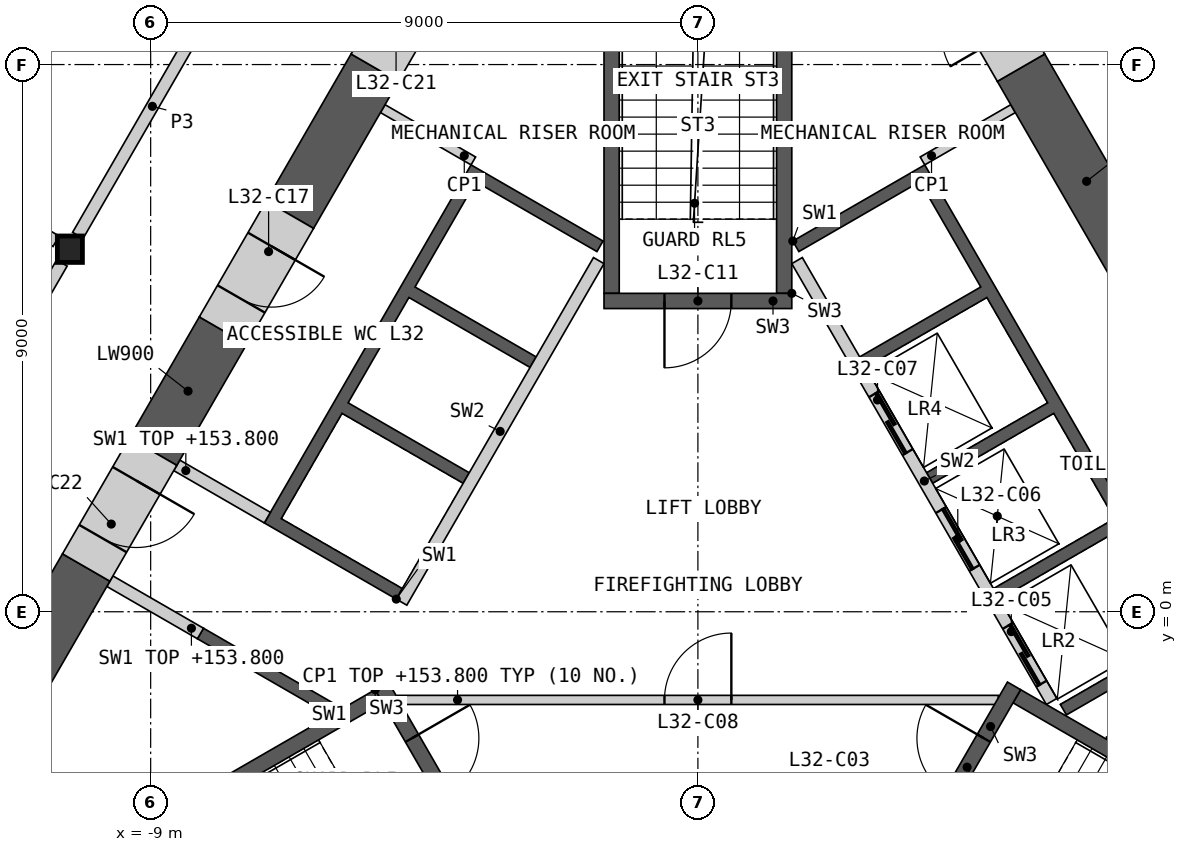
"""IFC4 building model, lengths in metres.
Left out: names, types, materials, properties, quantities, classifications, styles, units other than length and angle.
Written with IfcOpenShell. Run it as: python <this file> out.ifc"""

import sys

from ifc_helpers import new_model, si_unit, direction, frame, frame_2d, origin, origin_2d, place, context, subcontext, project, spatial, polyline, rectangle, i_section, outline, extrude, element, fill, save


model = new_model("IFC4")
c1 = context("Model", 3, precision=1e-05, world=origin(), true_north=direction((0.0, 1.0)))
c2 = subcontext(c1, "Body", "Model", "MODEL_VIEW")
j1 = project(units=[si_unit("LENGTHUNIT", "METRE"), si_unit("PLANEANGLEUNIT", "RADIAN")], contexts=[c1])
p1 = place(None, origin())
s1 = spatial("IfcSite", under=j1, at=p1, CompositionType="ELEMENT")
p2 = place(p1, origin())
s2 = spatial("IfcBuilding", under=s1, at=p2, CompositionType="ELEMENT")
p3 = place(p2, frame((0.0, 0.0, 150.0)))
s3 = spatial("IfcBuildingStorey", under=s2, at=p3, CompositionType="ELEMENT", Elevation=150.0)
p4 = place(p3, frame((-10.328, 5.963, 0.0), z_axis=(0.0, 0.0, 1.0), x_axis=(1.0, 0.0, 0.0)))
e1 = element("IfcColumn", 1, at=p4, inside=s3, PredefinedType="COLUMN", context=c2, shape_type="SweptSolid", body=[
    extrude(i_section(OverallWidth=0.412, OverallDepth=0.435, WebThickness=0.036, FlangeThickness=0.057, at=origin_2d()), origin(), (0.0, 0.0, 1.0), 4.2),
])
p5 = place(p3, origin())
e2 = element("IfcWall", 2, at=p5, inside=s3, PredefinedType="SHEAR", context=c2, shape_type="SweptSolid", body=[
    extrude(outline(polyline([(1.561, 6.097), (3.731, 7.35), (8.231, -0.444), (6.061, -1.697), (5.96, -1.524), (7.952, -0.374), (6.952, 1.358), (4.96, 0.208), (4.861, 0.381), (6.852, 1.531), (5.852, 3.263), (3.861, 2.113), (3.76, 2.287), (5.752, 3.437), (4.752, 5.169), (2.76, 4.019), (2.66, 4.192), (4.652, 5.342), (3.652, 7.074), (1.66, 5.924), (1.561, 6.097)])), origin(), (0.0, 0.0, 1.0), 3.8),
])
p6 = place(p3, frame((5.817, -1.476, 0.0), z_axis=(0.0, 0.0, 1.0), x_axis=(-0.500002616675, 0.866023893041, 0.0)))
e3 = element("IfcWall", 3, at=p6, inside=s3, PredefinedType="SOLIDWALL", context=c2, shape_type="SweptSolid", body=[
    extrude(rectangle(XDim=8.373, YDim=0.2, at=frame_2d((4.187, 0.0))), origin(), (0.0, 0.0, 1.0), 3.8),
])
p7 = place(p6, frame((0.337, 0.0, 0.0)))
e4 = element("IfcOpeningElement", 4, at=p7, cuts=e3, PredefinedType="OPENING", context=c2, shape_type="SweptSolid", body=[
    extrude(rectangle(XDim=1.1, YDim=2.1, at=frame_2d((0.55, 1.05))), frame((0.0, 0.11, 0.0), z_axis=(0.0, -1.0, 0.0), x_axis=(1.0, 0.0, 0.0)), (0.0, 0.0, 1.0), 0.22),
])
p8 = place(p6, frame((2.537, 0.0, 0.0)))
e5 = element("IfcOpeningElement", 5, at=p8, cuts=e3, PredefinedType="OPENING", context=c2, shape_type="SweptSolid", body=[
    extrude(rectangle(XDim=1.1, YDim=2.1, at=frame_2d((0.55, 1.05))), frame((0.0, 0.11, 0.0), z_axis=(0.0, -1.0, 0.0), x_axis=(1.0, 0.0, 0.0)), (0.0, 0.0, 1.0), 0.22),
])
p9 = place(p6, frame((4.737, 0.0, 0.0)))
e6 = element("IfcOpeningElement", 6, at=p9, cuts=e3, PredefinedType="OPENING", context=c2, shape_type="SweptSolid", body=[
    extrude(rectangle(XDim=1.1, YDim=2.1, at=frame_2d((0.55, 1.05))), frame((0.0, 0.11, 0.0), z_axis=(0.0, -1.0, 0.0), x_axis=(1.0, 0.0, 0.0)), (0.0, 0.0, 1.0), 0.22),
])
p10 = place(p3, origin())
e7 = element("IfcWall", 7, at=p10, inside=s3, PredefinedType="SHEAR", context=c2, shape_type="SweptSolid", body=[
    extrude(outline(polyline([(-6.061, -1.697), (-8.231, -0.444), (-8.131, -0.271), (-5.96, -1.524), (-6.061, -1.697)])), origin(), (0.0, 0.0, 1.0), 3.8),
])
p11 = place(p3, origin())
e8 = element("IfcWall", 8, at=p11, inside=s3, PredefinedType="SHEAR", context=c2, shape_type="SweptSolid", body=[
    extrude(outline(polyline([(-4.96, 0.208), (-7.131, 1.461), (-3.731, 7.35), (-1.561, 6.097), (-1.66, 5.924), (-3.652, 7.074), (-4.652, 5.342), (-2.66, 4.192), (-2.76, 4.019), (-4.752, 5.169), (-5.752, 3.437), (-3.76, 2.287), (-3.861, 2.113), (-5.852, 3.263), (-6.852, 1.531), (-4.861, 0.381), (-4.96, 0.208)])), origin(), (0.0, 0.0, 1.0), 3.8),
])
p12 = place(p3, frame((-1.631, 5.776, 0.0), z_axis=(0.0, 0.0, 1.0), x_axis=(-0.499992876559, -0.866029516466, 0.0)))
e9 = element("IfcWall", 9, at=p12, inside=s3, PredefinedType="SOLIDWALL", context=c2, shape_type="SweptSolid", body=[
    extrude(rectangle(XDim=6.486, YDim=0.2, at=frame_2d((3.243, 0.0))), origin(), (0.0, 0.0, 1.0), 3.8),
])
for number, where, z_axis, x_axis in (
    (10, (-7.081, 1.548, 0.0), (0.0, 0.0, 1.0), (-0.866, 0.5, 0.0)),
    (11, (-8.181, -0.357, 0.0), (0.0, 0.0, 1.0), (-0.866, 0.5, 0.0)),
):
    element("IfcWall", number, at=place(p3, frame(where, z_axis=z_axis, x_axis=x_axis)), inside=s3, PredefinedType="SHEAR", context=c2, shape_type="SweptSolid", body=[
        extrude(rectangle(XDim=1.72, YDim=0.2, at=frame_2d((0.86, 0.0))), origin(), (0.0, 0.0, 1.0), 3.8),
    ])
p13 = place(p3, frame((-4.941, -1.45, 0.0), z_axis=(0.0, 0.0, 1.0), x_axis=(1.0, 0.0, 0.0)))
e12 = element("IfcWall", 12, at=p13, inside=s3, PredefinedType="PARTITIONING", context=c2, shape_type="SweptSolid", body=[
    extrude(rectangle(XDim=9.882, YDim=0.15, at=frame_2d((4.941, 0.0))), origin(), (0.0, 0.0, 1.0), 3.8),
])
p14 = place(p13, frame((4.391, 0.0, 0.0)))
e13 = element("IfcOpeningElement", 13, at=p14, cuts=e12, PredefinedType="OPENING", context=c2, shape_type="SweptSolid", body=[
    extrude(rectangle(XDim=1.1, YDim=2.1, at=frame_2d((0.55, 1.05))), frame((0.0, 0.085, 0.0), z_axis=(0.0, -1.0, 0.0), x_axis=(1.0, 0.0, 0.0)), (0.0, 0.0, 1.0), 0.17),
])
p15 = place(p3, origin())
e14 = element("IfcWall", 14, at=p15, inside=s3, PredefinedType="SHEAR", context=c2, shape_type="SweptSolid", body=[
    extrude(outline(polyline([(-5.307, -1.281), (-10.374, -4.206), (-10.032, -4.298), (-5.182, -1.498), (-5.307, -1.281)])), origin(), (0.0, 0.0, 1.0), 3.8),
])
p16 = place(p3, frame((-5.199, -1.219, 0.0), z_axis=(0.0, 0.0, 1.0), x_axis=(0.499982516597, -0.866035497597, 0.0)))
e15 = element("IfcWall", 15, at=p16, inside=s3, PredefinedType="SHEAR", context=c2, shape_type="SweptSolid", body=[
    extrude(rectangle(XDim=3.088, YDim=0.25, at=frame_2d((1.544, 0.0))), origin(), (0.0, 0.0, 1.0), 3.8),
])
p17 = place(p16, frame((0.994, 0.0, 0.0)))
e16 = element("IfcOpeningElement", 16, at=p17, cuts=e15, PredefinedType="OPENING", context=c2, shape_type="SweptSolid", body=[
    extrude(rectangle(XDim=1.1, YDim=2.1, at=frame_2d((0.55, 1.05))), frame((0.0, 0.135, 0.0), z_axis=(0.0, -1.0, 0.0), x_axis=(1.0, 0.0, 0.0)), (0.0, 0.0, 1.0), 0.27),
])
p18 = place(p3, origin())
e17 = element("IfcWall", 17, at=p18, inside=s3, PredefinedType="SHEAR", context=c2, shape_type="SweptSolid", body=[
    extrude(outline(polyline([(10.032, -4.298), (10.374, -4.206), (5.307, -1.281), (5.182, -1.498), (10.032, -4.298)])), origin(), (0.0, 0.0, 1.0), 3.8),
])
p19 = place(p3, frame((3.655, -3.893, 0.0), z_axis=(0.0, 0.0, 1.0), x_axis=(0.499982516597, 0.866035497597, 0.0)))
e18 = element("IfcWall", 18, at=p19, inside=s3, PredefinedType="SHEAR", context=c2, shape_type="SweptSolid", body=[
    extrude(rectangle(XDim=3.088, YDim=0.25, at=frame_2d((1.544, 0.0))), origin(), (0.0, 0.0, 1.0), 3.8),
])
p20 = place(p19, frame((0.994, 0.0, 0.0)))
e19 = element("IfcOpeningElement", 19, at=p20, cuts=e18, PredefinedType="OPENING", context=c2, shape_type="SweptSolid", body=[
    extrude(rectangle(XDim=1.1, YDim=2.1, at=frame_2d((0.55, 1.05))), frame((0.0, 0.135, 0.0), z_axis=(0.0, -1.0, 0.0), x_axis=(1.0, 0.0, 0.0)), (0.0, 0.0, 1.0), 0.27),
])
p21 = place(p3, origin())
e20 = element("IfcWall", 20, at=p21, inside=s3, PredefinedType="SHEAR", context=c2, shape_type="SweptSolid", body=[
    extrude(outline(polyline([(1.544, 5.237), (1.544, 11.087), (1.294, 10.837), (1.294, 5.237), (1.544, 5.237)])), origin(), (0.0, 0.0, 1.0), 3.8),
])
p22 = place(p3, origin())
e21 = element("IfcWall", 21, at=p22, inside=s3, PredefinedType="SHEAR", context=c2, shape_type="SweptSolid", body=[
    extrude(outline(polyline([(-1.294, 10.837), (-1.544, 11.087), (-1.544, 5.237), (-1.294, 5.237), (-1.294, 10.837)])), origin(), (0.0, 0.0, 1.0), 3.8),
])
p23 = place(p3, frame((1.544, 5.112, 0.0), z_axis=(0.0, 0.0, 1.0), x_axis=(-1.0, 0.0, 0.0)))
e22 = element("IfcWall", 22, at=p23, inside=s3, PredefinedType="SHEAR", context=c2, shape_type="SweptSolid", body=[
    extrude(rectangle(XDim=3.088, YDim=0.25, at=frame_2d((1.544, 0.0))), origin(), (0.0, 0.0, 1.0), 3.8),
])
p24 = place(p23, frame((0.994, 0.0, 0.0)))
e23 = element("IfcOpeningElement", 23, at=p24, cuts=e22, PredefinedType="OPENING", context=c2, shape_type="SweptSolid", body=[
    extrude(rectangle(XDim=1.1, YDim=2.1, at=frame_2d((0.55, 1.05))), frame((0.0, 0.135, 0.0), z_axis=(0.0, -1.0, 0.0), x_axis=(1.0, 0.0, 0.0)), (0.0, 0.0, 1.0), 0.27),
])
for number, where, z_axis, x_axis in (
    (24, (3.693, 7.415, 0.0), (0.0, 0.0, 1.0), (0.866, 0.5, 0.0)),
    (25, (-3.693, 7.415, 0.0), (0.0, 0.0, 1.0), (-0.866, 0.5, 0.0)),
):
    element("IfcWall", number, at=place(p3, frame(where, z_axis=z_axis, x_axis=x_axis)), inside=s3, PredefinedType="PARTITIONING", context=c2, shape_type="SweptSolid", body=[
        extrude(rectangle(XDim=1.72, YDim=0.15, at=frame_2d((0.86, 0.0))), origin(), (0.0, 0.0, 1.0), 3.8),
    ])
p25 = place(p3, frame((10.081, -0.208, 0.0), z_axis=(0.0, 0.0, 1.0), x_axis=(-0.86600766878, -0.50003071667, 0.0)))
e26 = element("IfcWall", 26, at=p25, inside=s3, PredefinedType="PARTITIONING", context=c2, shape_type="SweptSolid", body=[
    extrude(rectangle(XDim=3.839, YDim=0.15, at=frame_2d((1.919, 0.0))), origin(), (0.0, 0.0, 1.0), 3.8),
])
p26 = place(p3, frame((7.472, 5.211, 0.0), z_axis=(0.0, 0.0, 1.0), x_axis=(-0.499996693808, 0.866027312607, 0.0)))
e27 = element("IfcWall", 27, at=p26, inside=s3, PredefinedType="SHEAR", context=c2, shape_type="SweptSolid", body=[
    extrude(rectangle(XDim=4.315, YDim=0.9, at=frame_2d((2.158, 0.0))), origin(), (0.0, 0.0, 1.0), 3.8),
])
p27 = place(p3, frame((-10.06, 0.728, 0.0), z_axis=(0.0, 0.0, 1.0), x_axis=(-0.500021220092, -0.866013152012, 0.0)))
e28 = element("IfcWall", 28, at=p27, inside=s3, PredefinedType="SHEAR", context=c2, shape_type="SweptSolid", body=[
    extrude(rectangle(XDim=4.22, YDim=0.9, at=frame_2d((2.11, 0.0))), origin(), (0.0, 0.0, 1.0), 3.8),
])
p28 = place(p3, frame((-5.314, 8.948, 0.0), z_axis=(0.0, 0.0, 1.0), x_axis=(-0.49998480324, -0.86603417746, 0.0)))
e29 = element("IfcWall", 29, at=p28, inside=s3, PredefinedType="SHEAR", context=c2, shape_type="SweptSolid", body=[
    extrude(rectangle(XDim=2.792, YDim=0.9, at=frame_2d((1.396, 0.0))), origin(), (0.0, 0.0, 1.0), 3.8),
])
p29 = place(p3, frame((-7.81, 4.625, 0.0), z_axis=(0.0, 0.0, 1.0), x_axis=(-0.499952165731, -0.866053019151, 0.0)))
e30 = element("IfcWall", 30, at=p29, inside=s3, PredefinedType="SHEAR", context=c2, shape_type="SweptSolid", body=[
    extrude(rectangle(XDim=2.3, YDim=0.9, at=frame_2d((1.15, 0.0))), origin(), (0.0, 0.0, 1.0), 3.8),
])
p30 = place(p3, frame((-6.71, 6.53, 0.0), z_axis=(0.0, 0.0, 1.0), x_axis=(-0.50002983664, -0.866008176907, 0.0)))
e31 = element("IfcWall", 31, at=p30, inside=s3, PredefinedType="SHEAR", context=c2, shape_type="SweptSolid", body=[
    extrude(rectangle(XDim=2.2, YDim=0.9, at=frame_2d((1.1, 0.0))), origin(), (0.0, 0.0, 1.0), 3.8),
])
p31 = place(p30, frame((0.6, 0.0, 0.0)))
e32 = element("IfcOpeningElement", 32, at=p31, cuts=e31, PredefinedType="OPENING", context=c2, shape_type="SweptSolid", body=[
    extrude(rectangle(XDim=1.0, YDim=2.1, at=frame_2d((0.5, 1.05))), frame((0.0, 0.46, 0.0), z_axis=(0.0, -1.0, 0.0), x_axis=(1.0, 0.0, 0.0)), (0.0, 0.0, 1.0), 0.92),
])
p32 = place(p3, frame((5.314, 8.948, 0.0), z_axis=(0.0, 0.0, 1.0), x_axis=(-0.500077893725, 0.86598042715, 0.0)))
e33 = element("IfcWall", 33, at=p32, inside=s3, PredefinedType="SHEAR", context=c2, shape_type="SweptSolid", body=[
    extrude(rectangle(XDim=2.2, YDim=0.9, at=frame_2d((1.1, 0.0))), origin(), (0.0, 0.0, 1.0), 3.8),
])
p33 = place(p32, frame((0.6, 0.0, 0.0)))
e34 = element("IfcOpeningElement", 34, at=p33, cuts=e33, PredefinedType="OPENING", context=c2, shape_type="SweptSolid", body=[
    extrude(rectangle(XDim=1.0, YDim=2.1, at=frame_2d((0.5, 1.05))), frame((0.0, 0.46, 0.0), z_axis=(0.0, -1.0, 0.0), x_axis=(1.0, 0.0, 0.0)), (0.0, 0.0, 1.0), 0.92),
])
p34 = place(p3, frame((-4.214, 10.854, 0.0), z_axis=(0.0, 0.0, 1.0), x_axis=(-0.500077893725, -0.86598042715, 0.0)))
e35 = element("IfcWall", 35, at=p34, inside=s3, PredefinedType="SHEAR", context=c2, shape_type="SweptSolid", body=[
    extrude(rectangle(XDim=2.2, YDim=0.9, at=frame_2d((1.1, 0.0))), origin(), (0.0, 0.0, 1.0), 3.8),
])
p35 = place(p34, frame((0.6, 0.0, 0.0)))
e36 = element("IfcOpeningElement", 36, at=p35, cuts=e35, PredefinedType="OPENING", context=c2, shape_type="SweptSolid", body=[
    extrude(rectangle(XDim=1.0, YDim=2.1, at=frame_2d((0.5, 1.05))), frame((0.0, 0.46, 0.0), z_axis=(0.0, -1.0, 0.0), x_axis=(1.0, 0.0, 0.0)), (0.0, 0.0, 1.0), 0.92),
])
p36 = place(p3, frame((-8.96, 2.633, 0.0), z_axis=(0.0, 0.0, 1.0), x_axis=(-0.50002983664, -0.866008176907, 0.0)))
e37 = element("IfcWall", 37, at=p36, inside=s3, PredefinedType="SHEAR", context=c2, shape_type="SweptSolid", body=[
    extrude(rectangle(XDim=2.2, YDim=0.9, at=frame_2d((1.1, 0.0))), origin(), (0.0, 0.0, 1.0), 3.8),
])
p37 = place(p36, frame((0.55, 0.0, 0.0)))
e38 = element("IfcOpeningElement", 38, at=p37, cuts=e37, PredefinedType="OPENING", context=c2, shape_type="SweptSolid", body=[
    extrude(rectangle(XDim=1.1, YDim=2.1, at=frame_2d((0.55, 1.05))), frame((0.0, 0.46, 0.0), z_axis=(0.0, -1.0, 0.0), x_axis=(1.0, 0.0, 0.0)), (0.0, 0.0, 1.0), 0.92),
])
p38 = place(p3, frame((-15.361, -2.754, 0.0), z_axis=(0.0, 0.0, 1.0), x_axis=(0.500004141693, 0.866023012564, 0.0)))
e39 = element("IfcWall", 39, at=p38, inside=s3, PredefinedType="PARTITIONING", context=c2, shape_type="SweptSolid", body=[
    extrude(rectangle(XDim=9.803, YDim=0.2, at=frame_2d((4.902, 0.0))), origin(), (0.0, 0.0, 1.0), 3.8),
])
p39 = place(p38, frame((4.052, 0.0, 0.0)))
e40 = element("IfcOpeningElement", 40, at=p39, cuts=e39, PredefinedType="OPENING", context=c2, shape_type="SweptSolid", body=[
    extrude(rectangle(XDim=1.8, YDim=2.1, at=frame_2d((0.9, 1.05))), frame((0.0, 0.11, 0.0), z_axis=(0.0, -1.0, 0.0), x_axis=(1.0, 0.0, 0.0)), (0.0, 0.0, 1.0), 0.22),
])
p40 = place(p3, frame((5.295, 14.68, 0.0), z_axis=(0.0, 0.0, 1.0), x_axis=(0.500012035596, -0.866018454918, 0.0)))
e41 = element("IfcWall", 41, at=p40, inside=s3, PredefinedType="PARTITIONING", context=c2, shape_type="SweptSolid", body=[
    extrude(rectangle(XDim=9.803, YDim=0.2, at=frame_2d((4.902, 0.0))), origin(), (0.0, 0.0, 1.0), 3.8),
])
p41 = place(p40, frame((6.853, 0.0, 0.0)))
e42 = element("IfcOpeningElement", 42, at=p41, cuts=e41, PredefinedType="OPENING", context=c2, shape_type="SweptSolid", body=[
    extrude(rectangle(XDim=1.0, YDim=2.1, at=frame_2d((0.5, 1.05))), frame((0.0, 0.11, 0.0), z_axis=(0.0, -1.0, 0.0), x_axis=(1.0, 0.0, 0.0)), (0.0, 0.0, 1.0), 0.22),
])
p42 = place(p3, frame((-10.197, 6.19, 0.0), z_axis=(0.0, 0.0, 1.0), x_axis=(0.500012035596, 0.866018454918, 0.0)))
e43 = element("IfcWall", 43, at=p42, inside=s3, PredefinedType="PARTITIONING", context=c2, shape_type="SweptSolid", body=[
    extrude(rectangle(XDim=9.803, YDim=0.2, at=frame_2d((4.902, 0.0))), origin(), (0.0, 0.0, 1.0), 3.8),
])
p43 = place(p42, frame((4.376, 0.0, 0.0)))
e44 = element("IfcOpeningElement", 44, at=p43, cuts=e43, PredefinedType="OPENING", context=c2, shape_type="SweptSolid", body=[
    extrude(rectangle(XDim=0.95, YDim=2.1, at=frame_2d((0.475, 1.05))), frame((0.0, 0.11, 0.0), z_axis=(0.0, -1.0, 0.0), x_axis=(1.0, 0.0, 0.0)), (0.0, 0.0, 1.0), 0.22),
])
p44 = place(p3, frame((-13.223, 7.75, 0.0), z_axis=(0.0, 0.0, 1.0), x_axis=(0.499991226912, 0.86603046887, 0.0)))
e45 = element("IfcWall", 45, at=p44, inside=s3, PredefinedType="PARTITIONING", context=c2, shape_type="SweptSolid", body=[
    extrude(rectangle(XDim=17.429, YDim=0.2, at=frame_2d((8.715, 0.0))), origin(), (0.0, 0.0, 1.0), 2.885),
])
p45 = place(p44, frame((8.792, 0.0, 0.0)))
e46 = element("IfcOpeningElement", 46, at=p45, cuts=e45, PredefinedType="OPENING", context=c2, shape_type="SweptSolid", body=[
    extrude(rectangle(XDim=0.95, YDim=2.1, at=frame_2d((0.475, 1.05))), frame((0.0, 0.11, 0.0), z_axis=(0.0, -1.0, 0.0), x_axis=(1.0, 0.0, 0.0)), (0.0, 0.0, 1.0), 0.22),
])
p46 = place(p3, frame((-21.536, 12.434, 0.0), z_axis=(0.0, 0.0, 1.0), x_axis=(0.86602461759, -0.500001361726, 0.0)))
e47 = element("IfcWall", 47, at=p46, inside=s3, PredefinedType="PARTITIONING", context=c2, shape_type="SweptSolid", body=[
    extrude(rectangle(XDim=12.679, YDim=0.2, at=frame_2d((6.34, 0.0))), origin(), (0.0, 0.0, 1.0), 2.885),
])
p47 = place(p7, origin())
e48 = element("IfcDoor", 48, at=p47, inside=s3, OperationType="SLIDING_TO_LEFT", PredefinedType="DOOR", context=c2, shape_type="SweptSolid", body=[
    extrude(rectangle(XDim=1.1, YDim=2.1, at=frame_2d((0.55, 1.05))), frame((0.0, 0.025, 0.0), z_axis=(0.0, -1.0, 0.0), x_axis=(1.0, 0.0, 0.0)), (0.0, 0.0, 1.0), 0.05),
])
fill(e4, e48)
p48 = place(p8, origin())
e49 = element("IfcDoor", 49, at=p48, inside=s3, OperationType="SLIDING_TO_LEFT", PredefinedType="DOOR", context=c2, shape_type="SweptSolid", body=[
    extrude(rectangle(XDim=1.1, YDim=2.1, at=frame_2d((0.55, 1.05))), frame((0.0, 0.025, 0.0), z_axis=(0.0, -1.0, 0.0), x_axis=(1.0, 0.0, 0.0)), (0.0, 0.0, 1.0), 0.05),
])
fill(e5, e49)
p49 = place(p9, origin())
e50 = element("IfcDoor", 50, at=p49, inside=s3, OperationType="SLIDING_TO_LEFT", PredefinedType="DOOR", context=c2, shape_type="SweptSolid", body=[
    extrude(rectangle(XDim=1.1, YDim=2.1, at=frame_2d((0.55, 1.05))), frame((0.0, 0.025, 0.0), z_axis=(0.0, -1.0, 0.0), x_axis=(1.0, 0.0, 0.0)), (0.0, 0.0, 1.0), 0.05),
])
fill(e6, e50)
p50 = place(p14, origin())
e51 = element("IfcDoor", 51, at=p50, inside=s3, OperationType="SINGLE_SWING_RIGHT", PredefinedType="DOOR", context=c2, shape_type="SweptSolid", body=[
    extrude(rectangle(XDim=1.1, YDim=2.1, at=frame_2d((0.55, 1.05))), frame((0.0, 0.025, 0.0), z_axis=(0.0, -1.0, 0.0), x_axis=(1.0, 0.0, 0.0)), (0.0, 0.0, 1.0), 0.05),
])
fill(e13, e51)
p51 = place(p17, origin())
e52 = element("IfcDoor", 52, at=p51, inside=s3, OperationType="SINGLE_SWING_LEFT", PredefinedType="DOOR", context=c2, shape_type="SweptSolid", body=[
    extrude(rectangle(XDim=1.1, YDim=2.1, at=frame_2d((0.55, 1.05))), frame((0.0, 0.025, 0.0), z_axis=(0.0, -1.0, 0.0), x_axis=(1.0, 0.0, 0.0)), (0.0, 0.0, 1.0), 0.05),
])
fill(e16, e52)
p52 = place(p20, origin())
e53 = element("IfcDoor", 53, at=p52, inside=s3, OperationType="SINGLE_SWING_RIGHT", PredefinedType="DOOR", context=c2, shape_type="SweptSolid", body=[
    extrude(rectangle(XDim=1.1, YDim=2.1, at=frame_2d((0.55, 1.05))), frame((0.0, 0.025, 0.0), z_axis=(0.0, -1.0, 0.0), x_axis=(1.0, 0.0, 0.0)), (0.0, 0.0, 1.0), 0.05),
])
fill(e19, e53)
p53 = place(p24, origin())
e54 = element("IfcDoor", 54, at=p53, inside=s3, OperationType="SINGLE_SWING_RIGHT", PredefinedType="DOOR", context=c2, shape_type="SweptSolid", body=[
    extrude(rectangle(XDim=1.1, YDim=2.1, at=frame_2d((0.55, 1.05))), frame((0.0, 0.025, 0.0), z_axis=(0.0, -1.0, 0.0), x_axis=(1.0, 0.0, 0.0)), (0.0, 0.0, 1.0), 0.05),
])
fill(e23, e54)
p54 = place(p31, origin())
e55 = element("IfcDoor", 55, at=p54, inside=s3, OperationType="SINGLE_SWING_LEFT", PredefinedType="DOOR", context=c2, shape_type="SweptSolid", body=[
    extrude(rectangle(XDim=1.0, YDim=2.1, at=frame_2d((0.5, 1.05))), frame((0.0, 0.205, 0.0), z_axis=(0.0, -1.0, 0.0), x_axis=(1.0, 0.0, 0.0)), (0.0, 0.0, 1.0), 0.05),
])
fill(e32, e55)
p55 = place(p37, origin())
e56 = element("IfcDoor", 56, at=p55, inside=s3, OperationType="SINGLE_SWING_LEFT", PredefinedType="DOOR", context=c2, shape_type="SweptSolid", body=[
    extrude(rectangle(XDim=1.1, YDim=2.1, at=frame_2d((0.55, 1.05))), frame((0.0, 0.205, 0.0), z_axis=(0.0, -1.0, 0.0), x_axis=(1.0, 0.0, 0.0)), (0.0, 0.0, 1.0), 0.05),
])
fill(e38, e56)
save(model, sys.argv[1])
